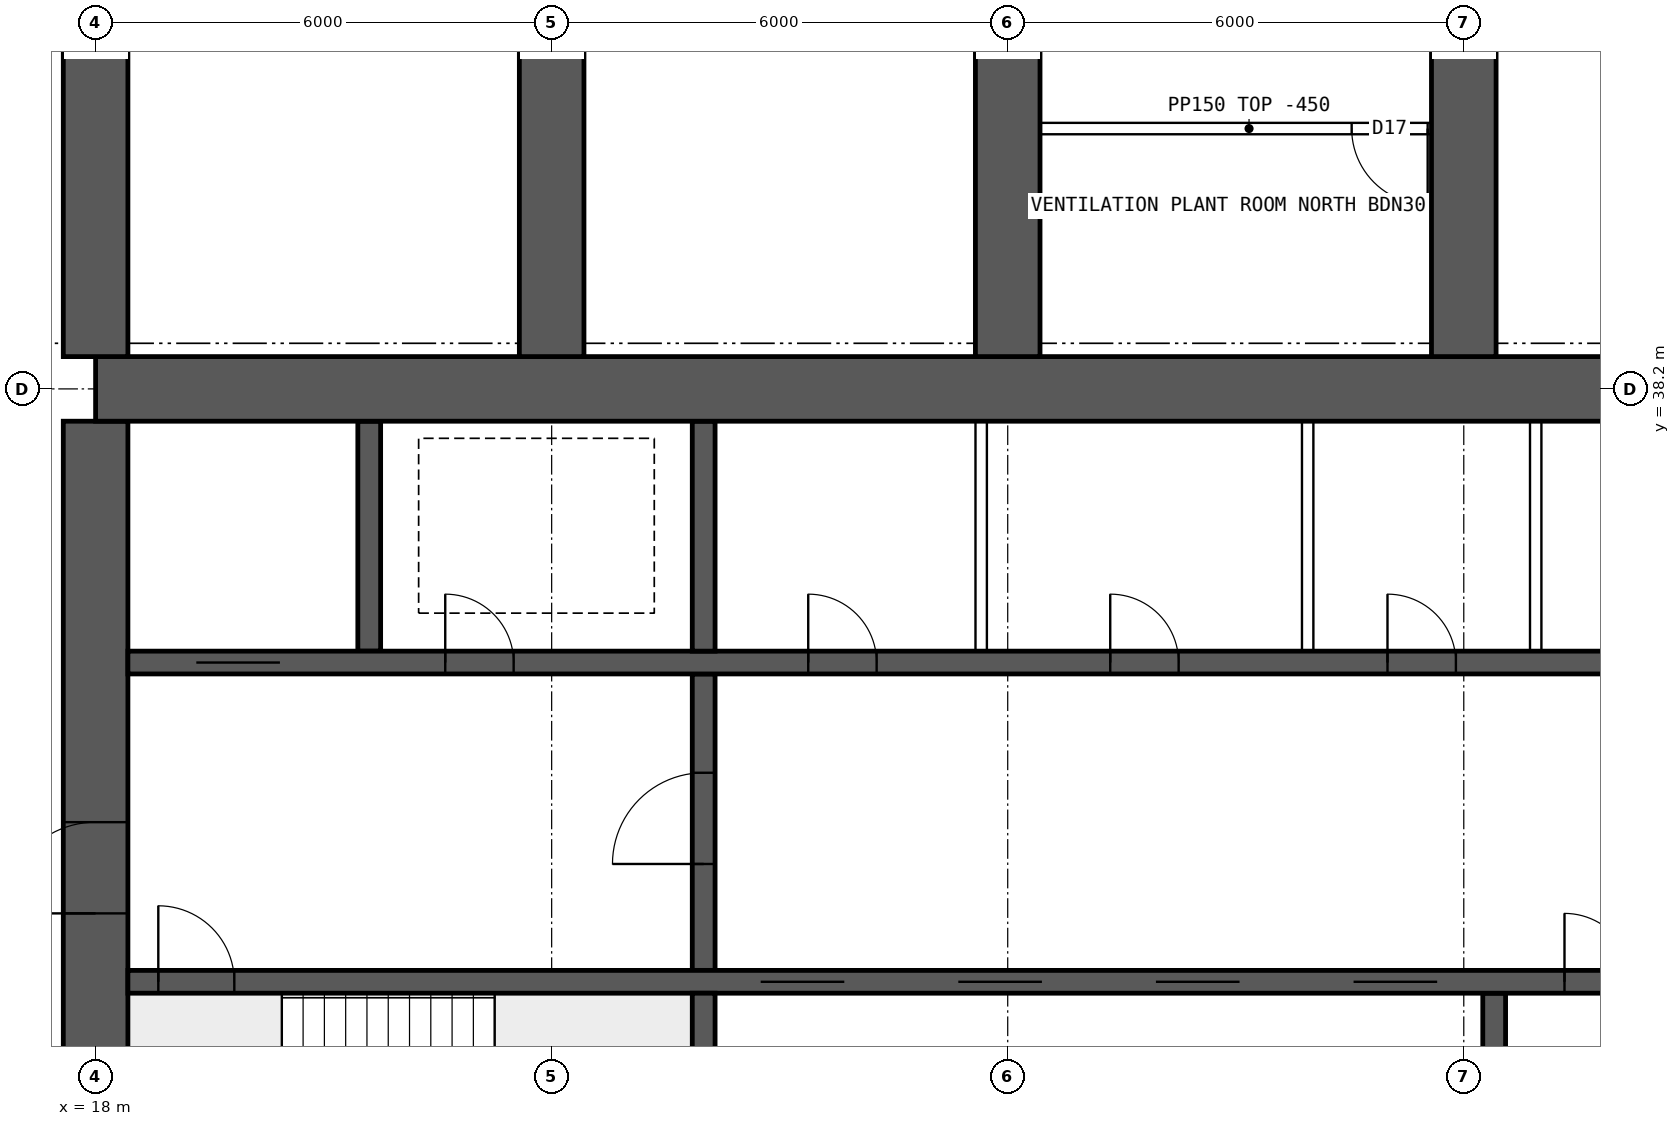
"""IFC4 building model, lengths in metres.
Left out: names, types, materials, properties, quantities, classifications, styles, units other than length and angle.
Written with IfcOpenShell. Run it as: python <this file> out.ifc"""

import sys

from ifc_helpers import new_model, si_unit, direction, frame, frame_2d, origin, place, context, subcontext, project, spatial, rectangle, extrude, element, fill, save


model = new_model("IFC4")
c1 = context("Model", 3, precision=1e-05, world=origin(), true_north=direction((0.0, 1.0)))
c2 = subcontext(c1, "Body", "Model", "MODEL_VIEW")
j1 = project(units=[si_unit("LENGTHUNIT", "METRE"), si_unit("PLANEANGLEUNIT", "RADIAN")], contexts=[c1])
p1 = place(None, origin())
s1 = spatial("IfcSite", under=j1, at=p1, CompositionType="ELEMENT")
p2 = place(p1, origin())
s2 = spatial("IfcBuilding", under=s1, at=p2, CompositionType="ELEMENT")
p3 = place(p2, frame((0.0, 0.0, 159.85)))
s3 = spatial("IfcBuildingStorey", under=s2, at=p3, CompositionType="ELEMENT", Elevation=159.85)
p4 = place(p3, frame((18.0, 38.2, 0.0), z_axis=(0.0, 0.0, 1.0), x_axis=(1.0, 0.0, 0.0)))
e1 = element("IfcWall", 1, at=p4, inside=s3, PredefinedType="SHEAR", context=c2, shape_type="SweptSolid", body=[
    extrude(rectangle(XDim=48.0, YDim=0.85, at=frame_2d((24.0, 0.0))), origin(), (0.0, 0.0, 1.0), 3.75),
])
p5 = place(p3, frame((18.0, 26.225, 0.0), z_axis=(0.0, 0.0, 1.0), x_axis=(0.0, 1.0, 0.0)))
e2 = element("IfcWall", 2, at=p5, inside=s3, PredefinedType="SHEAR", context=c2, shape_type="SweptSolid", body=[
    extrude(rectangle(XDim=11.55, YDim=0.85, at=frame_2d((5.775, 0.0))), origin(), (0.0, 0.0, 1.0), 3.75),
])
p6 = place(p5, frame((5.075, 0.0, 0.0)))
e3 = element("IfcOpeningElement", 3, at=p6, cuts=e2, PredefinedType="OPENING", context=c2, shape_type="SweptSolid", body=[
    extrude(rectangle(XDim=1.2, YDim=2.1, at=frame_2d((0.6, 1.05))), frame((0.0, 0.435, 0.0), z_axis=(0.0, -1.0, 0.0), x_axis=(1.0, 0.0, 0.0)), (0.0, 0.0, 1.0), 0.87),
])
p7 = place(p3, frame((18.425, 30.4, 0.0), z_axis=(0.0, 0.0, 1.0), x_axis=(1.0, 0.0, 0.0)))
e4 = element("IfcWall", 4, at=p7, inside=s3, PredefinedType="SHEAR", context=c2, shape_type="SweptSolid", body=[
    extrude(rectangle(XDim=47.15, YDim=0.3, at=frame_2d((23.575, 0.0))), origin(), (0.0, 0.0, 1.0), 3.75),
])
p8 = place(p7, frame((0.4, 0.0, 0.0)))
e5 = element("IfcOpeningElement", 5, at=p8, cuts=e4, PredefinedType="OPENING", context=c2, shape_type="SweptSolid", body=[
    extrude(rectangle(XDim=1.0, YDim=2.1, at=frame_2d((0.5, 1.05))), frame((0.0, 0.16, 0.0), z_axis=(0.0, -1.0, 0.0), x_axis=(1.0, 0.0, 0.0)), (0.0, 0.0, 1.0), 0.32),
])
p9 = place(p7, frame((45.75, 0.0, 0.0)))
e6 = element("IfcOpeningElement", 6, at=p9, cuts=e4, PredefinedType="OPENING", context=c2, shape_type="SweptSolid", body=[
    extrude(rectangle(XDim=1.0, YDim=2.1, at=frame_2d((0.5, 1.05))), frame((0.0, 0.16, 0.0), z_axis=(0.0, -1.0, 0.0), x_axis=(1.0, 0.0, 0.0)), (0.0, 0.0, 1.0), 0.32),
])
p10 = place(p7, frame((8.325, 0.0, 0.0)))
e7 = element("IfcOpeningElement", 7, at=p10, cuts=e4, PredefinedType="OPENING", context=c2, shape_type="SweptSolid", body=[
    extrude(rectangle(XDim=1.1, YDim=2.1, at=frame_2d((0.55, 1.05))), frame((0.0, 0.16, 0.0), z_axis=(0.0, -1.0, 0.0), x_axis=(1.0, 0.0, 0.0)), (0.0, 0.0, 1.0), 0.32),
])
p11 = place(p7, frame((10.925, 0.0, 0.0)))
e8 = element("IfcOpeningElement", 8, at=p11, cuts=e4, PredefinedType="OPENING", context=c2, shape_type="SweptSolid", body=[
    extrude(rectangle(XDim=1.1, YDim=2.1, at=frame_2d((0.55, 1.05))), frame((0.0, 0.16, 0.0), z_axis=(0.0, -1.0, 0.0), x_axis=(1.0, 0.0, 0.0)), (0.0, 0.0, 1.0), 0.32),
])
p12 = place(p7, frame((13.525, 0.0, 0.0)))
e9 = element("IfcOpeningElement", 9, at=p12, cuts=e4, PredefinedType="OPENING", context=c2, shape_type="SweptSolid", body=[
    extrude(rectangle(XDim=1.1, YDim=2.1, at=frame_2d((0.55, 1.05))), frame((0.0, 0.16, 0.0), z_axis=(0.0, -1.0, 0.0), x_axis=(1.0, 0.0, 0.0)), (0.0, 0.0, 1.0), 0.32),
])
p13 = place(p7, frame((16.125, 0.0, 0.0)))
e10 = element("IfcOpeningElement", 10, at=p13, cuts=e4, PredefinedType="OPENING", context=c2, shape_type="SweptSolid", body=[
    extrude(rectangle(XDim=1.1, YDim=2.1, at=frame_2d((0.55, 1.05))), frame((0.0, 0.16, 0.0), z_axis=(0.0, -1.0, 0.0), x_axis=(1.0, 0.0, 0.0)), (0.0, 0.0, 1.0), 0.32),
])
p14 = place(p7, frame((18.9, 0.0, 0.0)))
e11 = element("IfcOpeningElement", 11, at=p14, cuts=e4, PredefinedType="OPENING", context=c2, shape_type="SweptSolid", body=[
    extrude(rectangle(XDim=0.9, YDim=2.1, at=frame_2d((0.45, 1.05))), frame((0.0, 0.16, 0.0), z_axis=(0.0, -1.0, 0.0), x_axis=(1.0, 0.0, 0.0)), (0.0, 0.0, 1.0), 0.32),
])
p15 = place(p7, frame((30.192, 0.0, 0.0)))
e12 = element("IfcOpeningElement", 12, at=p15, cuts=e4, PredefinedType="OPENING", context=c2, shape_type="SweptSolid", body=[
    extrude(rectangle(XDim=1.1, YDim=2.1, at=frame_2d((0.55, 1.05))), frame((0.0, 0.16, 0.0), z_axis=(0.0, -1.0, 0.0), x_axis=(1.0, 0.0, 0.0)), (0.0, 0.0, 1.0), 0.32),
])
p16 = place(p7, frame((33.725, 0.0, 0.0)))
e13 = element("IfcOpeningElement", 13, at=p16, cuts=e4, PredefinedType="OPENING", context=c2, shape_type="SweptSolid", body=[
    extrude(rectangle(XDim=1.1, YDim=2.1, at=frame_2d((0.55, 1.05))), frame((0.0, 0.16, 0.0), z_axis=(0.0, -1.0, 0.0), x_axis=(1.0, 0.0, 0.0)), (0.0, 0.0, 1.0), 0.32),
])
p17 = place(p7, frame((37.258, 0.0, 0.0)))
e14 = element("IfcOpeningElement", 14, at=p17, cuts=e4, PredefinedType="OPENING", context=c2, shape_type="SweptSolid", body=[
    extrude(rectangle(XDim=1.1, YDim=2.1, at=frame_2d((0.55, 1.05))), frame((0.0, 0.16, 0.0), z_axis=(0.0, -1.0, 0.0), x_axis=(1.0, 0.0, 0.0)), (0.0, 0.0, 1.0), 0.32),
])
p18 = place(p3, frame((18.425, 34.6, 0.0), z_axis=(0.0, 0.0, 1.0), x_axis=(1.0, 0.0, 0.0)))
e15 = element("IfcWall", 15, at=p18, inside=s3, PredefinedType="SHEAR", context=c2, shape_type="SweptSolid", body=[
    extrude(rectangle(XDim=47.15, YDim=0.3, at=frame_2d((23.575, 0.0))), origin(), (0.0, 0.0, 1.0), 3.75),
])
p19 = place(p18, frame((0.9, 0.0, 0.0)))
e16 = element("IfcOpeningElement", 16, at=p19, cuts=e15, PredefinedType="OPENING", context=c2, shape_type="SweptSolid", body=[
    extrude(rectangle(XDim=1.1, YDim=2.1, at=frame_2d((0.55, 1.05))), frame((0.0, 0.16, 0.0), z_axis=(0.0, -1.0, 0.0), x_axis=(1.0, 0.0, 0.0)), (0.0, 0.0, 1.0), 0.32),
])
p20 = place(p18, frame((45.15, 0.0, 0.0)))
e17 = element("IfcOpeningElement", 17, at=p20, cuts=e15, PredefinedType="OPENING", context=c2, shape_type="SweptSolid", body=[
    extrude(rectangle(XDim=1.1, YDim=2.1, at=frame_2d((0.55, 1.05))), frame((0.0, 0.16, 0.0), z_axis=(0.0, -1.0, 0.0), x_axis=(1.0, 0.0, 0.0)), (0.0, 0.0, 1.0), 0.32),
])
p21 = place(p18, frame((4.175, 0.0, 0.0)))
e18 = element("IfcOpeningElement", 18, at=p21, cuts=e15, PredefinedType="OPENING", context=c2, shape_type="SweptSolid", body=[
    extrude(rectangle(XDim=0.9, YDim=2.1, at=frame_2d((0.45, 1.05))), frame((0.0, 0.16, 0.0), z_axis=(0.0, -1.0, 0.0), x_axis=(1.0, 0.0, 0.0)), (0.0, 0.0, 1.0), 0.32),
])
p22 = place(p18, frame((42.075, 0.0, 0.0)))
e19 = element("IfcOpeningElement", 19, at=p22, cuts=e15, PredefinedType="OPENING", context=c2, shape_type="SweptSolid", body=[
    extrude(rectangle(XDim=0.9, YDim=2.1, at=frame_2d((0.45, 1.05))), frame((0.0, 0.16, 0.0), z_axis=(0.0, -1.0, 0.0), x_axis=(1.0, 0.0, 0.0)), (0.0, 0.0, 1.0), 0.32),
])
p23 = place(p18, frame((8.95, 0.0, 0.0)))
e20 = element("IfcOpeningElement", 20, at=p23, cuts=e15, PredefinedType="OPENING", context=c2, shape_type="SweptSolid", body=[
    extrude(rectangle(XDim=0.9, YDim=2.1, at=frame_2d((0.45, 1.05))), frame((0.0, 0.16, 0.0), z_axis=(0.0, -1.0, 0.0), x_axis=(1.0, 0.0, 0.0)), (0.0, 0.0, 1.0), 0.32),
])
p24 = place(p18, frame((12.924, 0.0, 0.0)))
e21 = element("IfcOpeningElement", 21, at=p24, cuts=e15, PredefinedType="OPENING", context=c2, shape_type="SweptSolid", body=[
    extrude(rectangle(XDim=0.9, YDim=2.1, at=frame_2d((0.45, 1.05))), frame((0.0, 0.16, 0.0), z_axis=(0.0, -1.0, 0.0), x_axis=(1.0, 0.0, 0.0)), (0.0, 0.0, 1.0), 0.32),
])
p25 = place(p18, frame((16.571, 0.0, 0.0)))
e22 = element("IfcOpeningElement", 22, at=p25, cuts=e15, PredefinedType="OPENING", context=c2, shape_type="SweptSolid", body=[
    extrude(rectangle(XDim=0.9, YDim=2.1, at=frame_2d((0.45, 1.05))), frame((0.0, 0.16, 0.0), z_axis=(0.0, -1.0, 0.0), x_axis=(1.0, 0.0, 0.0)), (0.0, 0.0, 1.0), 0.32),
])
p26 = place(p18, frame((20.33, 0.0, 0.0)))
e23 = element("IfcOpeningElement", 23, at=p26, cuts=e15, PredefinedType="OPENING", context=c2, shape_type="SweptSolid", body=[
    extrude(rectangle(XDim=0.9, YDim=2.1, at=frame_2d((0.45, 1.05))), frame((0.0, 0.16, 0.0), z_axis=(0.0, -1.0, 0.0), x_axis=(1.0, 0.0, 0.0)), (0.0, 0.0, 1.0), 0.32),
])
p27 = place(p18, frame((24.736, 0.0, 0.0)))
e24 = element("IfcOpeningElement", 24, at=p27, cuts=e15, PredefinedType="OPENING", context=c2, shape_type="SweptSolid", body=[
    extrude(rectangle(XDim=0.9, YDim=2.1, at=frame_2d((0.45, 1.05))), frame((0.0, 0.16, 0.0), z_axis=(0.0, -1.0, 0.0), x_axis=(1.0, 0.0, 0.0)), (0.0, 0.0, 1.0), 0.32),
])
p28 = place(p18, frame((27.533, 0.0, 0.0)))
e25 = element("IfcOpeningElement", 25, at=p28, cuts=e15, PredefinedType="OPENING", context=c2, shape_type="SweptSolid", body=[
    extrude(rectangle(XDim=0.9, YDim=2.1, at=frame_2d((0.45, 1.05))), frame((0.0, 0.16, 0.0), z_axis=(0.0, -1.0, 0.0), x_axis=(1.0, 0.0, 0.0)), (0.0, 0.0, 1.0), 0.32),
])
p29 = place(p18, frame((29.906, 0.0, 0.0)))
e26 = element("IfcOpeningElement", 26, at=p29, cuts=e15, PredefinedType="OPENING", context=c2, shape_type="SweptSolid", body=[
    extrude(rectangle(XDim=0.9, YDim=2.1, at=frame_2d((0.45, 1.05))), frame((0.0, 0.16, 0.0), z_axis=(0.0, -1.0, 0.0), x_axis=(1.0, 0.0, 0.0)), (0.0, 0.0, 1.0), 0.32),
])
p30 = place(p18, frame((35.376, 0.0, 0.0)))
e27 = element("IfcOpeningElement", 27, at=p30, cuts=e15, PredefinedType="OPENING", context=c2, shape_type="SweptSolid", body=[
    extrude(rectangle(XDim=0.9, YDim=2.1, at=frame_2d((0.45, 1.05))), frame((0.0, 0.16, 0.0), z_axis=(0.0, -1.0, 0.0), x_axis=(1.0, 0.0, 0.0)), (0.0, 0.0, 1.0), 0.32),
])
p31 = place(p3, frame((26.0, 26.225, 0.0), z_axis=(0.0, 0.0, 1.0), x_axis=(0.0, 1.0, 0.0)))
e28 = element("IfcWall", 28, at=p31, inside=s3, PredefinedType="SHEAR", context=c2, shape_type="SweptSolid", body=[
    extrude(rectangle(XDim=4.025, YDim=0.3, at=frame_2d((2.012, 0.0))), origin(), (0.0, 0.0, 1.0), 3.75),
])
p32 = place(p3, frame((26.0, 30.55, 0.0), z_axis=(0.0, 0.0, 1.0), x_axis=(0.0, 1.0, 0.0)))
e29 = element("IfcWall", 29, at=p32, inside=s3, PredefinedType="SHEAR", context=c2, shape_type="SweptSolid", body=[
    extrude(rectangle(XDim=3.9, YDim=0.3, at=frame_2d((1.95, 0.0))), origin(), (0.0, 0.0, 1.0), 3.75),
])
p33 = place(p32, frame((1.4, 0.0, 0.0)))
e30 = element("IfcOpeningElement", 30, at=p33, cuts=e29, PredefinedType="OPENING", context=c2, shape_type="SweptSolid", body=[
    extrude(rectangle(XDim=1.2, YDim=2.1, at=frame_2d((0.6, 1.05))), frame((0.0, 0.16, 0.0), z_axis=(0.0, -1.0, 0.0), x_axis=(1.0, 0.0, 0.0)), (0.0, 0.0, 1.0), 0.32),
])
for number, where, z_axis, x_axis in (
    (31, (21.6, 34.75, 0.0), (0.0, 0.0, 1.0), (0.0, 1.0, 0.0)),
    (32, (26.0, 34.75, 0.0), (0.0, 0.0, 1.0), (0.0, 1.0, 0.0)),
):
    element("IfcWall", number, at=place(p3, frame(where, z_axis=z_axis, x_axis=x_axis)), inside=s3, PredefinedType="SHEAR", context=c2, shape_type="SweptSolid", body=[
        extrude(rectangle(XDim=3.025, YDim=0.3, at=frame_2d((1.512, 0.0))), origin(), (0.0, 0.0, 1.0), 3.75),
    ])
p34 = place(p3, frame((36.4, 26.225, 0.0), z_axis=(0.0, 0.0, 1.0), x_axis=(0.0, 1.0, 0.0)))
e33 = element("IfcWall", 33, at=p34, inside=s3, PredefinedType="SHEAR", context=c2, shape_type="SweptSolid", body=[
    extrude(rectangle(XDim=4.025, YDim=0.3, at=frame_2d((2.012, 0.0))), origin(), (0.0, 0.0, 1.0), 3.75),
])
for number, where, z_axis, x_axis in (
    (34, (18.0, 38.625, 0.0), (0.0, 0.0, 1.0), (0.0, 1.0, 0.0)),
    (35, (24.0, 38.625, 0.0), (0.0, 0.0, 1.0), (0.0, 1.0, 0.0)),
    (36, (30.0, 38.625, 0.0), (0.0, 0.0, 1.0), (0.0, 1.0, 0.0)),
    (37, (36.0, 38.625, 0.0), (0.0, 0.0, 1.0), (0.0, 1.0, 0.0)),
):
    element("IfcWall", number, at=place(p3, frame(where, z_axis=z_axis, x_axis=x_axis)), inside=s3, PredefinedType="SHEAR", context=c2, shape_type="SweptSolid", body=[
        extrude(rectangle(XDim=8.175, YDim=0.85, at=frame_2d((4.087, 0.0))), origin(), (0.0, 0.0, 1.0), 3.75),
    ])
for number, where, z_axis, x_axis in (
    (38, (29.651, 34.75, 0.0), (0.0, 0.0, 1.0), (0.0, 1.0, 0.0)),
    (39, (33.946, 34.75, 0.0), (0.0, 0.0, 1.0), (0.0, 1.0, 0.0)),
    (40, (36.946, 34.75, 0.0), (0.0, 0.0, 1.0), (0.0, 1.0, 0.0)),
):
    element("IfcWall", number, at=place(p3, frame(where, z_axis=z_axis, x_axis=x_axis)), inside=s3, PredefinedType="SOLIDWALL", context=c2, shape_type="SweptSolid", body=[
        extrude(rectangle(XDim=3.025, YDim=0.15, at=frame_2d((1.512, 0.0))), origin(), (0.0, 0.0, 1.0), 3.3),
    ])
p35 = place(p3, frame((35.925, 41.625, 0.0), z_axis=(0.0, 0.0, 1.0), x_axis=(-1.0, 0.0, 0.0)))
e41 = element("IfcWall", 41, at=p35, inside=s3, PredefinedType="PARTITIONING", context=c2, shape_type="SweptSolid", body=[
    extrude(rectangle(XDim=5.5, YDim=0.15, at=frame_2d((2.75, 0.0))), origin(), (0.0, 0.0, 1.0), 3.3),
])
p36 = place(p35, frame((0.4, 0.0, 0.0)))
e42 = element("IfcOpeningElement", 42, at=p36, cuts=e41, PredefinedType="OPENING", context=c2, shape_type="SweptSolid", body=[
    extrude(rectangle(XDim=1.0, YDim=2.1, at=frame_2d((0.5, 1.05))), frame((0.0, 0.085, 0.0), z_axis=(0.0, -1.0, 0.0), x_axis=(1.0, 0.0, 0.0)), (0.0, 0.0, 1.0), 0.17),
])
p37 = place(p6, origin())
e43 = element("IfcDoor", 43, at=p37, inside=s3, OperationType="SINGLE_SWING_LEFT", PredefinedType="DOOR", context=c2, shape_type="SweptSolid", body=[
    extrude(rectangle(XDim=1.2, YDim=2.1, at=frame_2d((0.6, 1.05))), frame((0.0, 0.025, 0.0), z_axis=(0.0, -1.0, 0.0), x_axis=(1.0, 0.0, 0.0)), (0.0, 0.0, 1.0), 0.05),
])
fill(e3, e43)
p38 = place(p8, origin())
e44 = element("IfcDoor", 44, at=p38, inside=s3, OperationType="SINGLE_SWING_LEFT", PredefinedType="DOOR", context=c2, shape_type="SweptSolid", body=[
    extrude(rectangle(XDim=1.0, YDim=2.1, at=frame_2d((0.5, 1.05))), frame((0.0, 0.025, 0.0), z_axis=(0.0, -1.0, 0.0), x_axis=(1.0, 0.0, 0.0)), (0.0, 0.0, 1.0), 0.05),
])
fill(e5, e44)
p39 = place(p19, origin())
e45 = element("IfcDoor", 45, at=p39, inside=s3, OperationType="DOUBLE_DOOR_SLIDING", PredefinedType="DOOR", context=c2, shape_type="SweptSolid", body=[
    extrude(rectangle(XDim=1.1, YDim=2.1, at=frame_2d((0.55, 1.05))), frame((0.0, 0.025, 0.0), z_axis=(0.0, -1.0, 0.0), x_axis=(1.0, 0.0, 0.0)), (0.0, 0.0, 1.0), 0.05),
])
fill(e16, e45)
p40 = place(p21, origin())
e46 = element("IfcDoor", 46, at=p40, inside=s3, OperationType="SINGLE_SWING_LEFT", PredefinedType="DOOR", context=c2, shape_type="SweptSolid", body=[
    extrude(rectangle(XDim=0.9, YDim=2.1, at=frame_2d((0.45, 1.05))), frame((0.0, 0.025, 0.0), z_axis=(0.0, -1.0, 0.0), x_axis=(1.0, 0.0, 0.0)), (0.0, 0.0, 1.0), 0.05),
])
fill(e18, e46)
p41 = place(p33, origin())
e47 = element("IfcDoor", 47, at=p41, inside=s3, OperationType="SINGLE_SWING_LEFT", PredefinedType="DOOR", context=c2, shape_type="SweptSolid", body=[
    extrude(rectangle(XDim=1.2, YDim=2.1, at=frame_2d((0.6, 1.05))), frame((0.0, 0.025, 0.0), z_axis=(0.0, -1.0, 0.0), x_axis=(1.0, 0.0, 0.0)), (0.0, 0.0, 1.0), 0.05),
])
fill(e30, e47)
p42 = place(p23, origin())
e48 = element("IfcDoor", 48, at=p42, inside=s3, OperationType="SINGLE_SWING_LEFT", PredefinedType="DOOR", context=c2, shape_type="SweptSolid", body=[
    extrude(rectangle(XDim=0.9, YDim=2.1, at=frame_2d((0.45, 1.05))), frame((0.0, 0.025, 0.0), z_axis=(0.0, -1.0, 0.0), x_axis=(1.0, 0.0, 0.0)), (0.0, 0.0, 1.0), 0.05),
])
fill(e20, e48)
p43 = place(p24, origin())
e49 = element("IfcDoor", 49, at=p43, inside=s3, OperationType="SINGLE_SWING_LEFT", PredefinedType="DOOR", context=c2, shape_type="SweptSolid", body=[
    extrude(rectangle(XDim=0.9, YDim=2.1, at=frame_2d((0.45, 1.05))), frame((0.0, 0.025, 0.0), z_axis=(0.0, -1.0, 0.0), x_axis=(1.0, 0.0, 0.0)), (0.0, 0.0, 1.0), 0.05),
])
fill(e21, e49)
p44 = place(p25, origin())
e50 = element("IfcDoor", 50, at=p44, inside=s3, OperationType="SINGLE_SWING_LEFT", PredefinedType="DOOR", context=c2, shape_type="SweptSolid", body=[
    extrude(rectangle(XDim=0.9, YDim=2.1, at=frame_2d((0.45, 1.05))), frame((0.0, 0.025, 0.0), z_axis=(0.0, -1.0, 0.0), x_axis=(1.0, 0.0, 0.0)), (0.0, 0.0, 1.0), 0.05),
])
fill(e22, e50)
p45 = place(p10, origin())
e51 = element("IfcDoor", 51, at=p45, inside=s3, OperationType="DOUBLE_DOOR_SLIDING", PredefinedType="DOOR", context=c2, shape_type="SweptSolid", body=[
    extrude(rectangle(XDim=1.1, YDim=2.1, at=frame_2d((0.55, 1.05))), frame((0.0, 0.025, 0.0), z_axis=(0.0, -1.0, 0.0), x_axis=(1.0, 0.0, 0.0)), (0.0, 0.0, 1.0), 0.05),
])
fill(e7, e51)
p46 = place(p11, origin())
e52 = element("IfcDoor", 52, at=p46, inside=s3, OperationType="DOUBLE_DOOR_SLIDING", PredefinedType="DOOR", context=c2, shape_type="SweptSolid", body=[
    extrude(rectangle(XDim=1.1, YDim=2.1, at=frame_2d((0.55, 1.05))), frame((0.0, 0.025, 0.0), z_axis=(0.0, -1.0, 0.0), x_axis=(1.0, 0.0, 0.0)), (0.0, 0.0, 1.0), 0.05),
])
fill(e8, e52)
p47 = place(p12, origin())
e53 = element("IfcDoor", 53, at=p47, inside=s3, OperationType="DOUBLE_DOOR_SLIDING", PredefinedType="DOOR", context=c2, shape_type="SweptSolid", body=[
    extrude(rectangle(XDim=1.1, YDim=2.1, at=frame_2d((0.55, 1.05))), frame((0.0, 0.025, 0.0), z_axis=(0.0, -1.0, 0.0), x_axis=(1.0, 0.0, 0.0)), (0.0, 0.0, 1.0), 0.05),
])
fill(e9, e53)
p48 = place(p13, origin())
e54 = element("IfcDoor", 54, at=p48, inside=s3, OperationType="DOUBLE_DOOR_SLIDING", PredefinedType="DOOR", context=c2, shape_type="SweptSolid", body=[
    extrude(rectangle(XDim=1.1, YDim=2.1, at=frame_2d((0.55, 1.05))), frame((0.0, 0.025, 0.0), z_axis=(0.0, -1.0, 0.0), x_axis=(1.0, 0.0, 0.0)), (0.0, 0.0, 1.0), 0.05),
])
fill(e10, e54)
p49 = place(p14, origin())
e55 = element("IfcDoor", 55, at=p49, inside=s3, OperationType="SINGLE_SWING_LEFT", PredefinedType="DOOR", context=c2, shape_type="SweptSolid", body=[
    extrude(rectangle(XDim=0.9, YDim=2.1, at=frame_2d((0.45, 1.05))), frame((0.0, 0.025, 0.0), z_axis=(0.0, -1.0, 0.0), x_axis=(1.0, 0.0, 0.0)), (0.0, 0.0, 1.0), 0.05),
])
fill(e11, e55)
p50 = place(p36, origin())
e56 = element("IfcDoor", 56, at=p50, inside=s3, OperationType="SINGLE_SWING_LEFT", PredefinedType="DOOR", context=c2, shape_type="SweptSolid", body=[
    extrude(rectangle(XDim=1.0, YDim=2.1, at=frame_2d((0.5, 1.05))), frame((0.0, 0.025, 0.0), z_axis=(0.0, -1.0, 0.0), x_axis=(1.0, 0.0, 0.0)), (0.0, 0.0, 1.0), 0.05),
])
fill(e42, e56)
save(model, sys.argv[1])
